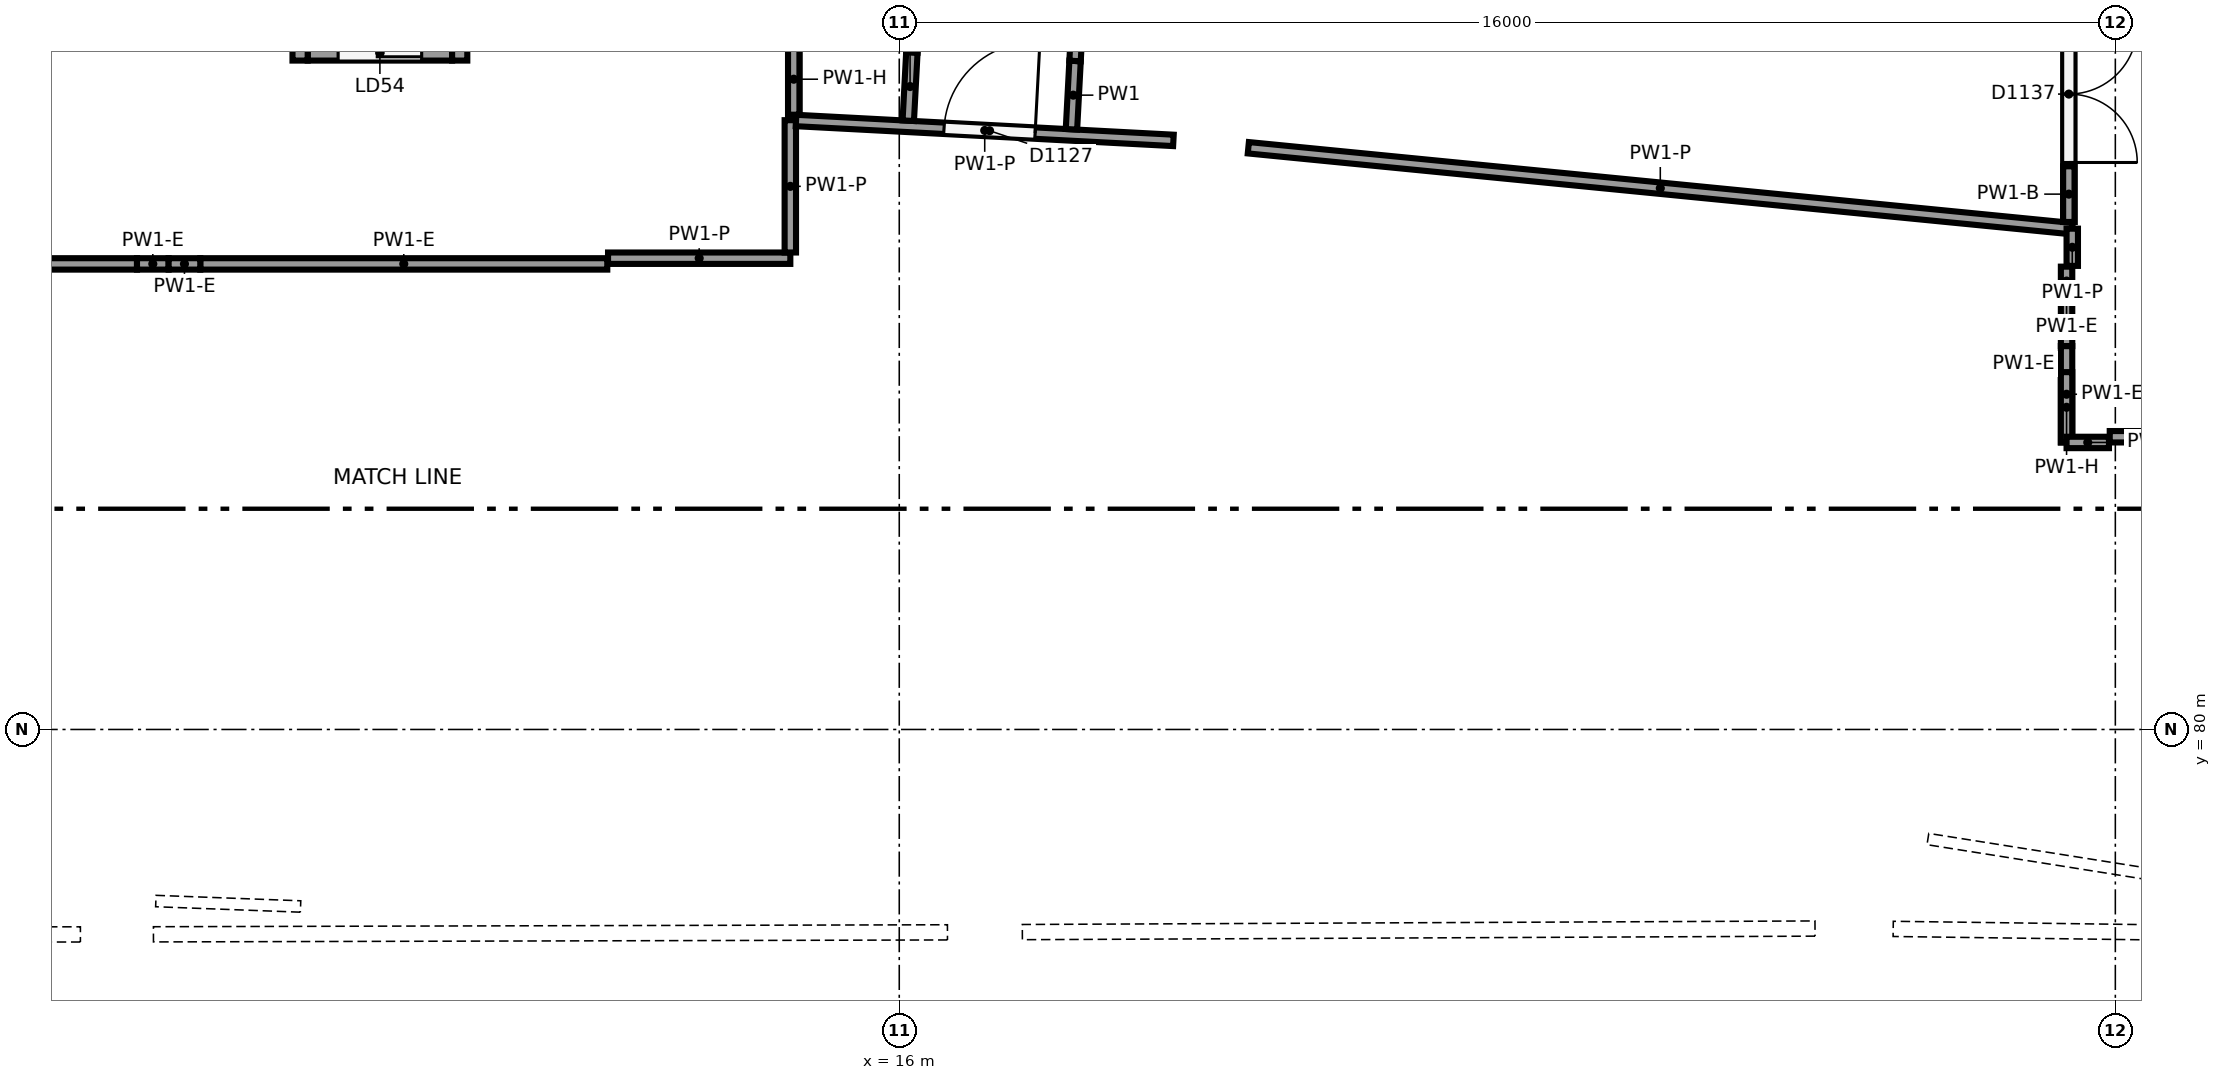
"""IFC4 building model, lengths in metres.
Left out: names, types, materials, properties, quantities, classifications, styles, units other than length and angle.
Written with IfcOpenShell. Run it as: python <this file> out.ifc"""

import sys

from ifc_helpers import new_model, si_unit, direction, frame, frame_2d, origin, origin_2d, place, context, subcontext, project, spatial, rectangle, circle, extrude, element, fill, save


model = new_model("IFC4")
c1 = context("Model", 3, precision=1e-05, world=origin(), true_north=direction((0.0, 1.0)))
c2 = subcontext(c1, "Body", "Model", "MODEL_VIEW")
j1 = project(units=[si_unit("LENGTHUNIT", "METRE"), si_unit("PLANEANGLEUNIT", "RADIAN")], contexts=[c1])
p1 = place(None, origin())
s1 = spatial("IfcSite", under=j1, at=p1, CompositionType="ELEMENT")
p2 = place(p1, origin())
s2 = spatial("IfcBuilding", under=s1, at=p2, CompositionType="ELEMENT")
p3 = place(p2, frame((0.0, 0.0, 12.0)))
s3 = spatial("IfcBuildingStorey", under=s2, at=p3, CompositionType="ELEMENT", Elevation=12.0)
p4 = place(p3, frame((28.565, 77.383, 0.0), z_axis=(0.0, 0.0, 1.0), x_axis=(1.0, 0.0, 0.0)))
e1 = element("IfcColumn", 1, at=p4, inside=s3, PredefinedType="COLUMN", context=c2, shape_type="SweptSolid", body=[
    extrude(circle(Radius=0.35, at=origin_2d()), origin(), (0.0, 0.0, 1.0), 5.294),
])
p5 = place(p3, frame((31.737, 85.377, 0.0), z_axis=(0.0, 0.0, 1.0), x_axis=(1.0, 0.0, 0.0)))
e2 = element("IfcColumn", 2, at=p5, inside=s3, PredefinedType="COLUMN", context=c2, shape_type="SweptSolid", body=[
    extrude(circle(Radius=0.4, at=origin_2d()), origin(), (0.0, 0.0, 1.0), 6.0),
])
p6 = place(p3, frame((17.127, 77.332, 0.0), z_axis=(0.0, 0.0, 1.0), x_axis=(1.0, 0.0, 0.0)))
e3 = element("IfcColumn", 3, at=p6, inside=s3, PredefinedType="COLUMN", context=c2, shape_type="SweptSolid", body=[
    extrude(circle(Radius=0.35, at=origin_2d()), origin(), (0.0, 0.0, 1.0), 4.763),
])
p7 = place(p3, frame((19.119, 85.698, 0.0), z_axis=(0.0, 0.0, 1.0), x_axis=(1.0, 0.0, 0.0)))
e4 = element("IfcColumn", 4, at=p7, inside=s3, PredefinedType="COLUMN", context=c2, shape_type="SweptSolid", body=[
    extrude(circle(Radius=0.4, at=origin_2d()), origin(), (0.0, 0.0, 1.0), 6.0),
])
p8 = place(p3, frame((5.707, 77.304, 0.0), z_axis=(0.0, 0.0, 1.0), x_axis=(1.0, 0.0, 0.0)))
e5 = element("IfcColumn", 5, at=p8, inside=s3, PredefinedType="COLUMN", context=c2, shape_type="SweptSolid", body=[
    extrude(circle(Radius=0.35, at=origin_2d()), origin(), (0.0, 0.0, 1.0), 4.194),
])
p9 = place(p3, frame((6.387, 85.877, 0.0), z_axis=(0.0, 0.0, 1.0), x_axis=(1.0, 0.0, 0.0)))
e6 = element("IfcColumn", 6, at=p9, inside=s3, PredefinedType="COLUMN", context=c2, shape_type="SweptSolid", body=[
    extrude(circle(Radius=0.4, at=origin_2d()), origin(), (0.0, 0.0, 1.0), 6.0),
])
for number, where, z_axis, x_axis in (
    (7, (10.217, 91.8, 0.0), (0.0, 0.0, 1.0), (0.0, -1.0, 0.0)),
    (8, (8.117, 91.8, 0.0), (0.0, 0.0, 1.0), (0.0, -1.0, 0.0)),
):
    element("IfcWall", number, at=place(p3, frame(where, z_axis=z_axis, x_axis=x_axis)), inside=s3, PredefinedType="SHEAR", context=c2, shape_type="SweptSolid", body=[
        extrude(rectangle(XDim=3.0, YDim=0.2, at=frame_2d((1.5, 0.0))), origin(), (0.0, 0.0, 1.0), 5.65),
    ])
p10 = place(p3, frame((10.117, 88.9, 0.0), z_axis=(0.0, 0.0, 1.0), x_axis=(-1.0, 0.0, 0.0)))
e9 = element("IfcWall", 9, at=p10, inside=s3, PredefinedType="SHEAR", context=c2, shape_type="SweptSolid", body=[
    extrude(rectangle(XDim=1.9, YDim=0.2, at=frame_2d((0.95, 0.0))), origin(), (0.0, 0.0, 1.0), 5.65),
])
p11 = place(p10, frame((0.4, 0.0, 0.0)))
e10 = element("IfcOpeningElement", 10, at=p11, cuts=e9, PredefinedType="OPENING", context=c2, shape_type="SweptSolid", body=[
    extrude(rectangle(XDim=1.1, YDim=2.1, at=frame_2d((0.55, 1.05))), frame((0.0, 0.11, 0.0), z_axis=(0.0, -1.0, 0.0), x_axis=(1.0, 0.0, 0.0)), (0.0, 0.0, 1.0), 0.22),
])
p12 = place(p3, frame((35.211, 77.658, 0.0), z_axis=(0.0, 0.0, 1.0), x_axis=(-0.987660465211, 0.156610361914, 0.0)))
e11 = element("IfcWall", 11, at=p12, inside=s3, PredefinedType="PARTITIONING", context=c2, shape_type="SweptSolid", body=[
    extrude(rectangle(XDim=5.748, YDim=0.15, at=frame_2d((2.874, 0.0))), origin(), (0.0, 0.0, 1.0), 3.697),
])
p13 = place(p3, frame((31.926, 83.851, 0.0), z_axis=(0.0, 0.0, 1.0), x_axis=(1.0, 0.0, 0.0)))
e12 = element("IfcWall", 12, at=p13, inside=s3, PredefinedType="PARTITIONING", context=c2, shape_type="SweptSolid", body=[
    extrude(rectangle(XDim=8.871, YDim=0.15, at=frame_2d((4.436, 0.0))), origin(), (0.0, 0.0, 1.0), 3.697),
])
p14 = place(p3, frame((8.123, 77.671, 0.0), z_axis=(0.0, 0.0, 1.0), x_axis=(-0.999290037332, 0.037675207871, 0.0)))
e13 = element("IfcWall", 13, at=p14, inside=s3, PredefinedType="PARTITIONING", context=c2, shape_type="SweptSolid", body=[
    extrude(rectangle(XDim=1.905, YDim=0.15, at=frame_2d((0.953, 0.0))), origin(), (0.0, 0.0, 1.0), 3.873),
])
p15 = place(p3, frame((12.168, 86.2, 0.0), z_axis=(0.0, 0.0, 1.0), x_axis=(1.0, 0.0, 0.0)))
e14 = element("IfcWall", 14, at=p15, inside=s3, PredefinedType="PARTITIONING", context=c2, shape_type="SweptSolid", body=[
    extrude(rectangle(XDim=2.398, YDim=0.15, at=frame_2d((1.199, 0.0))), origin(), (0.0, 0.0, 1.0), 3.907),
])
p16 = place(p3, frame((14.567, 86.275, 0.0), z_axis=(0.0, 0.0, 1.0), x_axis=(0.0, 1.0, 0.0)))
e15 = element("IfcWall", 15, at=p16, inside=s3, PredefinedType="PARTITIONING", context=c2, shape_type="SweptSolid", body=[
    extrude(rectangle(XDim=1.741, YDim=0.15, at=frame_2d((0.871, 0.0))), origin(), (0.0, 0.0, 1.0), 3.907),
])
p17 = place(p3, frame((14.642, 88.012, 0.0), z_axis=(0.0, 0.0, 1.0), x_axis=(0.998613893233, -0.052633565738, 0.0)))
e16 = element("IfcWall", 16, at=p17, inside=s3, PredefinedType="PARTITIONING", context=c2, shape_type="SweptSolid", body=[
    extrude(rectangle(XDim=4.972, YDim=0.15, at=frame_2d((2.486, 0.0))), origin(), (0.0, 0.0, 1.0), 3.907),
])
p18 = place(p17, frame((1.95, 0.0, 0.0)))
e17 = element("IfcOpeningElement", 17, at=p18, cuts=e16, PredefinedType="OPENING", context=c2, shape_type="SweptSolid", body=[
    extrude(rectangle(XDim=1.2, YDim=2.1, at=frame_2d((0.6, 1.05))), frame((0.0, 0.085, 0.0), z_axis=(0.0, -1.0, 0.0), x_axis=(1.0, 0.0, 0.0)), (0.0, 0.0, 1.0), 0.17),
])
p19 = place(p3, frame((20.593, 87.653, 0.0), z_axis=(0.0, 0.0, 1.0), x_axis=(0.995211610703, -0.097743797362, 0.0)))
e18 = element("IfcWall", 18, at=p19, inside=s3, PredefinedType="PARTITIONING", context=c2, shape_type="SweptSolid", body=[
    extrude(rectangle(XDim=10.893, YDim=0.15, at=frame_2d((5.446, 0.0))), origin(), (0.0, 0.0, 1.0), 3.907),
])
p20 = place(p3, frame((31.433, 86.589, 0.0), z_axis=(0.0, 0.0, 1.0), x_axis=(0.0, -1.0, 0.0)))
e19 = element("IfcWall", 19, at=p20, inside=s3, PredefinedType="PARTITIONING", context=c2, shape_type="SweptSolid", body=[
    extrude(rectangle(XDim=0.49, YDim=0.15, at=frame_2d((0.245, 0.0))), origin(), (0.0, 0.0, 1.0), 3.907),
])
p21 = place(p3, frame((31.388, 91.809, 0.0), z_axis=(0.0, 0.0, 1.0), x_axis=(0.0, -1.0, 0.0)))
e20 = element("IfcWall", 20, at=p21, inside=s3, PredefinedType="PARTITIONING", context=c2, shape_type="SweptSolid", body=[
    extrude(rectangle(XDim=5.133, YDim=0.15, at=frame_2d((2.566, 0.0))), origin(), (0.0, 0.0, 1.0), 4.55),
])
p22 = place(p21, frame((2.55, 0.0, 0.0)))
e21 = element("IfcOpeningElement", 21, at=p22, cuts=e20, PredefinedType="OPENING", context=c2, shape_type="SweptSolid", body=[
    extrude(rectangle(XDim=1.8, YDim=2.1, at=frame_2d((0.9, 1.05))), frame((0.0, 0.085, 0.0), z_axis=(0.0, -1.0, 0.0), x_axis=(1.0, 0.0, 0.0)), (0.0, 0.0, 1.0), 0.17),
])
p23 = place(p3, frame((31.388, 87.409, 4.55), z_axis=(0.0, 0.0, 1.0), x_axis=(0.0, -1.0, 0.0)))
e22 = element("IfcWall", 22, at=p23, inside=s3, PredefinedType="PARTITIONING", context=c2, shape_type="SweptSolid", body=[
    extrude(rectangle(XDim=0.732, YDim=0.15, at=frame_2d((0.366, 0.0))), origin(), (0.0, 0.0, 1.0), 1.1),
])
p24 = place(p3, frame((31.358, 86.089, 0.0), z_axis=(0.0, 0.0, 1.0), x_axis=(0.0, -1.0, 0.0)))
e23 = element("IfcWall", 23, at=p24, inside=s3, PredefinedType="PARTITIONING", context=c2, shape_type="SweptSolid", body=[
    extrude(rectangle(XDim=0.38, YDim=0.15, at=frame_2d((0.19, 0.0))), origin(), (0.0, 0.0, 1.0), 4.35),
])
p25 = place(p3, frame((31.358, 85.044, 0.0), z_axis=(0.0, 0.0, 1.0), x_axis=(0.0, -1.0, 0.0)))
e24 = element("IfcWall", 24, at=p25, inside=s3, PredefinedType="PARTITIONING", context=c2, shape_type="SweptSolid", body=[
    extrude(rectangle(XDim=1.268, YDim=0.15, at=frame_2d((0.634, 0.0))), origin(), (0.0, 0.0, 1.0), 4.35),
])
p26 = place(p3, frame((31.358, 84.701, 4.35), z_axis=(0.0, 0.0, 1.0), x_axis=(0.0, -1.0, 0.0)))
e25 = element("IfcWall", 25, at=p26, inside=s3, PredefinedType="PARTITIONING", context=c2, shape_type="SweptSolid", body=[
    extrude(rectangle(XDim=0.925, YDim=0.15, at=frame_2d((0.462, 0.0))), origin(), (0.0, 0.0, 1.0), 1.3),
])
p27 = place(p3, frame((31.358, 83.776, 0.0), z_axis=(0.0, 0.0, 1.0), x_axis=(1.0, 0.0, 0.0)))
e26 = element("IfcWall", 26, at=p27, inside=s3, PredefinedType="PARTITIONING", context=c2, shape_type="SweptSolid", body=[
    extrude(rectangle(XDim=0.558, YDim=0.15, at=frame_2d((0.279, 0.0))), origin(), (0.0, 0.0, 1.0), 5.65),
])
p28 = place(p3, frame((31.358, 85.709, 0.0), z_axis=(0.0, 0.0, 1.0), x_axis=(0.0, -1.0, 0.0)))
e27 = element("IfcWall", 27, at=p28, inside=s3, PredefinedType="PARTITIONING", context=c2, shape_type="SweptSolid", body=[
    extrude(rectangle(XDim=0.665, YDim=0.15, at=frame_2d((0.333, 0.0))), origin(), (0.0, 0.0, 1.0), 4.35),
])
p29 = place(p3, frame((0.692, 86.125, 0.0), z_axis=(0.0, 0.0, 1.0), x_axis=(1.0, 0.0, 0.0)))
e28 = element("IfcWall", 28, at=p29, inside=s3, PredefinedType="PARTITIONING", context=c2, shape_type="SweptSolid", body=[
    extrude(rectangle(XDim=5.279, YDim=0.15, at=frame_2d((2.64, 0.0))), origin(), (0.0, 0.0, 1.0), 4.35),
])
p30 = place(p3, frame((6.803, 86.125, 0.0), z_axis=(0.0, 0.0, 1.0), x_axis=(1.0, 0.0, 0.0)))
e29 = element("IfcWall", 29, at=p30, inside=s3, PredefinedType="PARTITIONING", context=c2, shape_type="SweptSolid", body=[
    extrude(rectangle(XDim=5.355, YDim=0.15, at=frame_2d((2.678, 0.0))), origin(), (0.0, 0.0, 1.0), 4.35),
])
p31 = place(p3, frame((14.612, 88.088, 0.0), z_axis=(0.0, 0.0, 1.0), x_axis=(0.0, 1.0, 0.0)))
e30 = element("IfcWall", 30, at=p31, inside=s3, PredefinedType="PARTITIONING", context=c2, shape_type="SweptSolid", body=[
    extrude(rectangle(XDim=4.422, YDim=0.15, at=frame_2d((2.211, 0.0))), origin(), (0.0, 0.0, 1.0), 4.35),
])
p32 = place(p31, frame((0.95, 0.0, 0.0)))
e31 = element("IfcOpeningElement", 31, at=p32, cuts=e30, PredefinedType="OPENING", context=c2, shape_type="SweptSolid", body=[
    extrude(rectangle(XDim=1.8, YDim=2.1, at=frame_2d((0.9, 1.05))), frame((0.0, 0.085, 0.0), z_axis=(0.0, -1.0, 0.0), x_axis=(1.0, 0.0, 0.0)), (0.0, 0.0, 1.0), 0.17),
])
p33 = place(p3, frame((14.612, 88.088, 4.35), z_axis=(0.0, 0.0, 1.0), x_axis=(0.0, 1.0, 0.0)))
e32 = element("IfcWall", 32, at=p33, inside=s3, PredefinedType="PARTITIONING", context=c2, shape_type="SweptSolid", body=[
    extrude(rectangle(XDim=0.935, YDim=0.15, at=frame_2d((0.467, 0.0))), origin(), (0.0, 0.0, 1.0), 1.3),
])
p34 = place(p3, frame((5.971, 86.125, 0.0), z_axis=(0.0, 0.0, 1.0), x_axis=(1.0, 0.0, 0.0)))
e33 = element("IfcWall", 33, at=p34, inside=s3, PredefinedType="PARTITIONING", context=c2, shape_type="SweptSolid", body=[
    extrude(rectangle(XDim=0.417, YDim=0.15, at=frame_2d((0.208, 0.0))), origin(), (0.0, 0.0, 1.0), 4.35),
])
p35 = place(p3, frame((6.387, 86.125, 0.0), z_axis=(0.0, 0.0, 1.0), x_axis=(1.0, 0.0, 0.0)))
e34 = element("IfcWall", 34, at=p35, inside=s3, PredefinedType="PARTITIONING", context=c2, shape_type="SweptSolid", body=[
    extrude(rectangle(XDim=0.416, YDim=0.15, at=frame_2d((0.208, 0.0))), origin(), (0.0, 0.0, 1.0), 4.35),
])
p36 = place(p3, frame((16.119, 88.009, 0.0), z_axis=(0.0, 0.0, 1.0), x_axis=(0.052630027564, 0.998614079712, 0.0)))
e35 = element("IfcWall", 35, at=p36, inside=s3, PredefinedType="PARTITIONING", context=c2, shape_type="SweptSolid", body=[
    extrude(rectangle(XDim=0.9, YDim=0.15, at=frame_2d((0.45, 0.0))), origin(), (0.0, 0.0, 1.0), 5.65),
])
p37 = place(p3, frame((16.166, 88.908, 0.0), z_axis=(0.0, 0.0, 1.0), x_axis=(0.052615773272, 0.998614830855, 0.0)))
e36 = element("IfcWall", 36, at=p37, inside=s3, PredefinedType="PARTITIONING", context=c2, shape_type="SweptSolid", body=[
    extrude(rectangle(XDim=0.45, YDim=0.15, at=frame_2d((0.225, 0.0))), origin(), (0.0, 0.0, 1.0), 4.35),
])
p38 = place(p3, frame((18.266, 87.896, 0.0), z_axis=(0.0, 0.0, 1.0), x_axis=(0.052615773272, 0.998614830855, 0.0)))
e37 = element("IfcWall", 37, at=p38, inside=s3, PredefinedType="PARTITIONING", context=c2, shape_type="SweptSolid", body=[
    extrude(rectangle(XDim=0.9, YDim=0.15, at=frame_2d((0.45, 0.0))), origin(), (0.0, 0.0, 1.0), 5.65),
])
p39 = place(p3, frame((18.313, 88.795, 0.0), z_axis=(0.0, 0.0, 1.0), x_axis=(0.052644289572, 0.998613327958, 0.0)))
e38 = element("IfcWall", 38, at=p39, inside=s3, PredefinedType="PARTITIONING", context=c2, shape_type="SweptSolid", body=[
    extrude(rectangle(XDim=0.45, YDim=0.15, at=frame_2d((0.225, 0.0))), origin(), (0.0, 0.0, 1.0), 4.35),
])
p40 = place(p11, origin())
e39 = element("IfcDoor", 39, at=p40, inside=s3, OperationType="SLIDING_TO_RIGHT", PredefinedType="DOOR", context=c2, shape_type="SweptSolid", body=[
    extrude(rectangle(XDim=1.1, YDim=2.1, at=frame_2d((0.55, 1.05))), frame((0.0, 0.025, 0.0), z_axis=(0.0, -1.0, 0.0), x_axis=(1.0, 0.0, 0.0)), (0.0, 0.0, 1.0), 0.05),
])
fill(e10, e39)
p41 = place(p18, origin())
e40 = element("IfcDoor", 40, at=p41, inside=s3, OperationType="SINGLE_SWING_RIGHT", PredefinedType="DOOR", context=c2, shape_type="SweptSolid", body=[
    extrude(rectangle(XDim=1.2, YDim=2.1, at=frame_2d((0.6, 1.05))), frame((0.0, 0.025, 0.0), z_axis=(0.0, -1.0, 0.0), x_axis=(1.0, 0.0, 0.0)), (0.0, 0.0, 1.0), 0.05),
])
fill(e17, e40)
p42 = place(p22, origin())
e41 = element("IfcDoor", 41, at=p42, inside=s3, OperationType="DOUBLE_DOOR_SINGLE_SWING", PredefinedType="DOOR", context=c2, shape_type="SweptSolid", body=[
    extrude(rectangle(XDim=1.8, YDim=2.1, at=frame_2d((0.9, 1.05))), frame((0.0, 0.025, 0.0), z_axis=(0.0, -1.0, 0.0), x_axis=(1.0, 0.0, 0.0)), (0.0, 0.0, 1.0), 0.05),
])
fill(e21, e41)
save(model, sys.argv[1])
